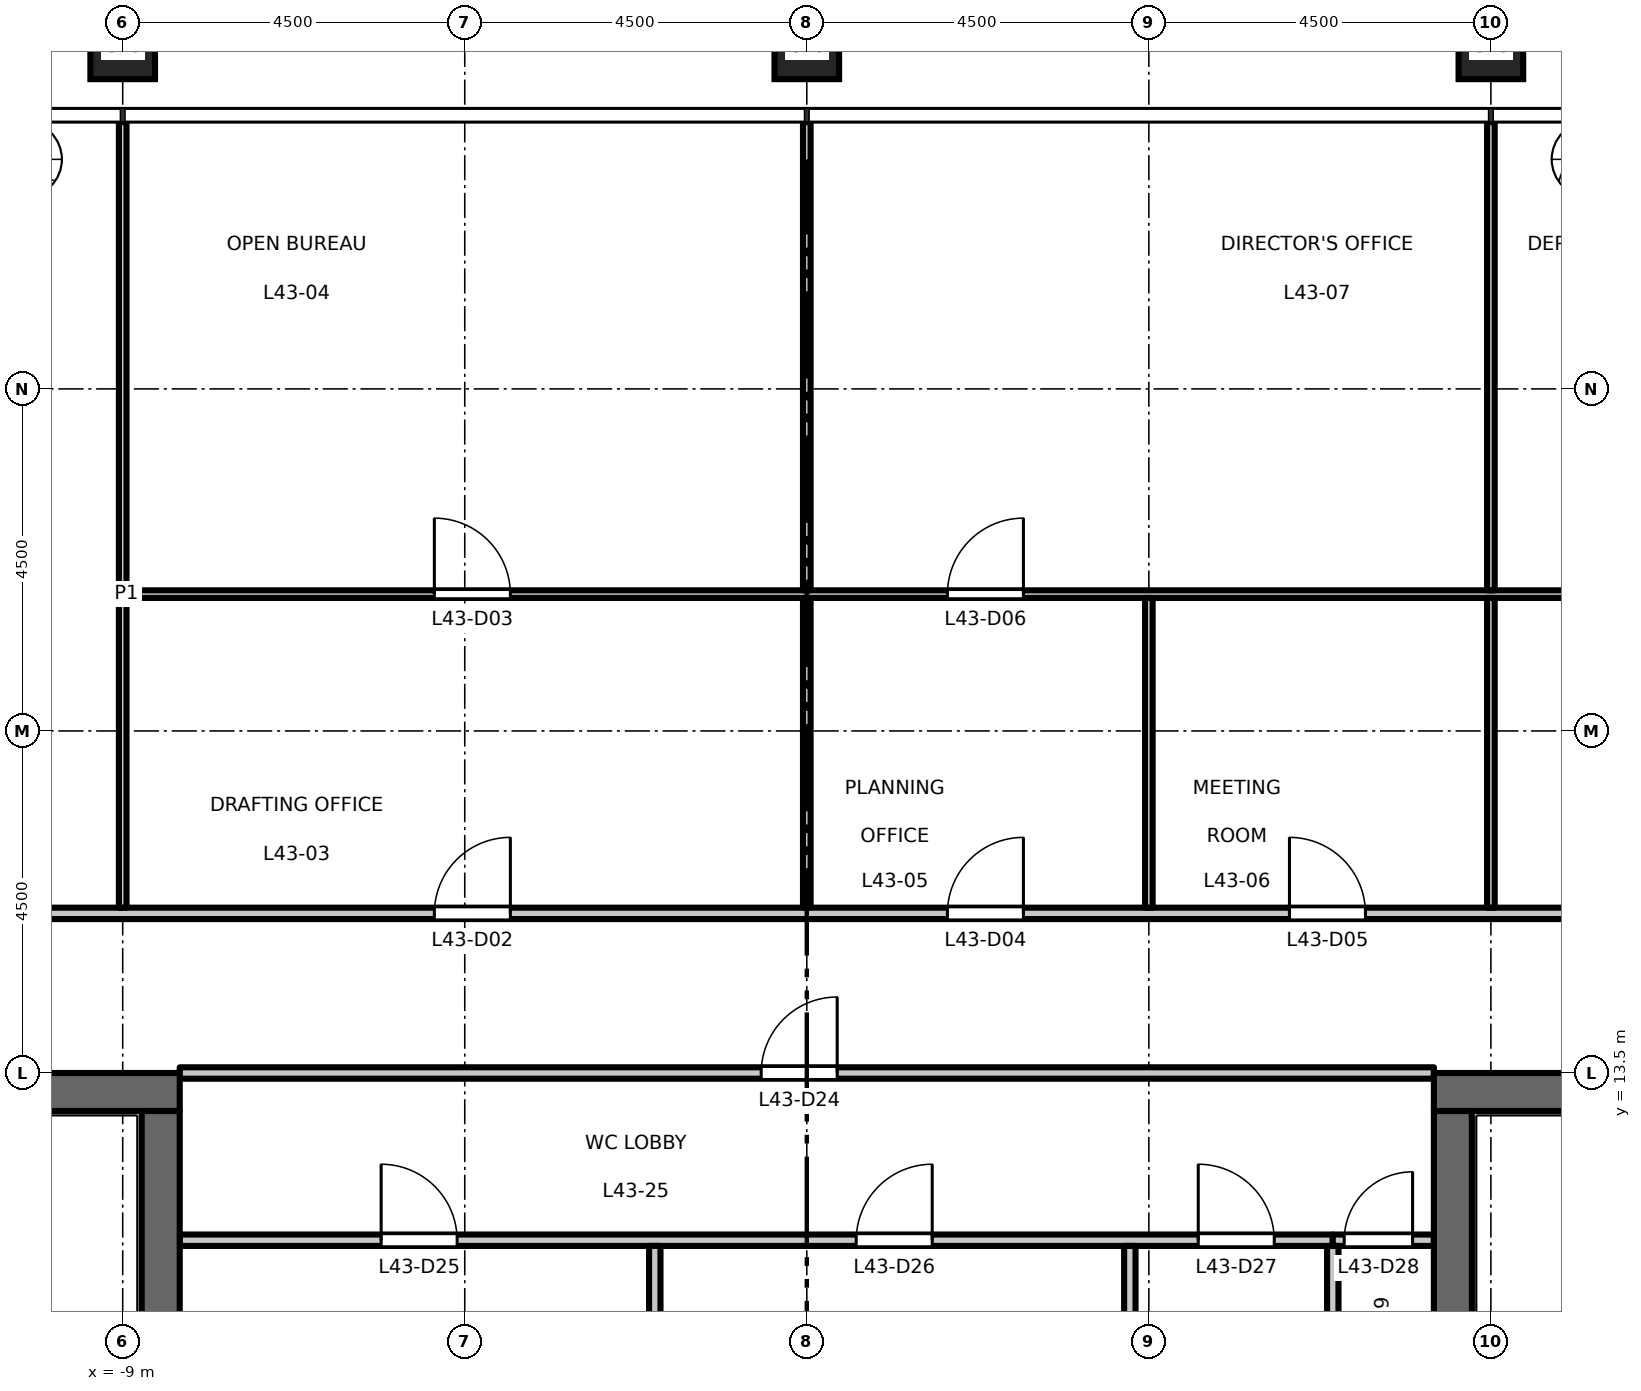
"""IFC4 building model, lengths in metres.
Left out: names, types, materials, properties, quantities, classifications, styles, units other than length and angle.
Written with IfcOpenShell. Run it as: python <this file> out.ifc"""

import sys

from ifc_helpers import new_model, si_unit, direction, frame, frame_2d, origin, origin_2d, place, context, subcontext, project, spatial, rectangle, hollow_rectangle, extrude, element, fill, save


model = new_model("IFC4")
c1 = context("Model", 3, precision=1e-05, world=origin(), true_north=direction((0.0, 1.0)))
c2 = subcontext(c1, "Body", "Model", "MODEL_VIEW")
j1 = project(units=[si_unit("LENGTHUNIT", "METRE"), si_unit("PLANEANGLEUNIT", "RADIAN")], contexts=[c1])
p1 = place(None, origin())
s1 = spatial("IfcSite", under=j1, at=p1, CompositionType="ELEMENT")
p2 = place(p1, origin())
s2 = spatial("IfcBuilding", under=s1, at=p2, CompositionType="ELEMENT")
p3 = place(p2, frame((0.0, 0.0, 201.7)))
s3 = spatial("IfcBuildingStorey", under=s2, at=p3, CompositionType="ELEMENT", Elevation=201.7)
for number, where, z_axis, x_axis in (
    (1, (9.0, 27.0, 0.0), (0.0, 0.0, 1.0), (1.0, 0.0, 0.0)),
    (2, (0.0, 27.0, 0.0), (0.0, 0.0, 1.0), (1.0, 0.0, 0.0)),
    (3, (-9.0, 27.0, 0.0), (0.0, 0.0, 1.0), (1.0, 0.0, 0.0)),
):
    element("IfcColumn", number, at=place(p3, frame(where, z_axis=z_axis, x_axis=x_axis)), inside=s3, PredefinedType="COLUMN", context=c2, shape_type="SweptSolid", body=[
        extrude(hollow_rectangle(XDim=0.85, YDim=0.85, WallThickness=0.05, at=origin_2d()), origin(), (0.0, 0.0, 1.0), 4.5),
    ])
p4 = place(p3, frame((-8.25, 13.25, 0.0), z_axis=(0.0, 0.0, 1.0), x_axis=(-1.0, 0.0, 0.0)))
e4 = element("IfcWall", 4, at=p4, inside=s3, PredefinedType="SHEAR", context=c2, shape_type="SweptSolid", body=[
    extrude(rectangle(XDim=13.5, YDim=0.5, at=frame_2d((6.75, 0.0))), origin(), (0.0, 0.0, 1.0), 4.35),
])
p5 = place(p3, frame((-8.5, -13.0, 0.0), z_axis=(0.0, 0.0, 1.0), x_axis=(0.0, 1.0, 0.0)))
e5 = element("IfcWall", 5, at=p5, inside=s3, PredefinedType="SHEAR", context=c2, shape_type="SweptSolid", body=[
    extrude(rectangle(XDim=26.0, YDim=0.5, at=frame_2d((13.0, 0.0))), origin(), (0.0, 0.0, 1.0), 4.35),
])
p6 = place(p3, frame((8.25, 13.25, 0.0), z_axis=(0.0, 0.0, 1.0), x_axis=(1.0, 0.0, 0.0)))
e6 = element("IfcWall", 6, at=p6, inside=s3, PredefinedType="SHEAR", context=c2, shape_type="SweptSolid", body=[
    extrude(rectangle(XDim=13.5, YDim=0.5, at=frame_2d((6.75, 0.0))), origin(), (0.0, 0.0, 1.0), 4.35),
])
p7 = place(p3, frame((8.5, -13.0, 0.0), z_axis=(0.0, 0.0, 1.0), x_axis=(0.0, 1.0, 0.0)))
e7 = element("IfcWall", 7, at=p7, inside=s3, PredefinedType="SHEAR", context=c2, shape_type="SweptSolid", body=[
    extrude(rectangle(XDim=26.0, YDim=0.5, at=frame_2d((13.0, 0.0))), origin(), (0.0, 0.0, 1.0), 4.35),
])
p8 = place(p3, frame((-8.25, 11.3, 0.0), z_axis=(0.0, 0.0, 1.0), x_axis=(1.0, 0.0, 0.0)))
e8 = element("IfcWall", 8, at=p8, inside=s3, PredefinedType="PARTITIONING", context=c2, shape_type="SweptSolid", body=[
    extrude(rectangle(XDim=15.17, YDim=0.15, at=frame_2d((7.585, 0.0))), origin(), (0.0, 0.0, 1.0), 4.35),
])
p9 = place(p8, frame((2.65, 0.0, 0.0)))
e9 = element("IfcOpeningElement", 9, at=p9, cuts=e8, PredefinedType="OPENING", context=c2, shape_type="SweptSolid", body=[
    extrude(rectangle(XDim=1.0, YDim=2.1, at=frame_2d((0.5, 1.05))), frame((0.0, 0.085, 0.0), z_axis=(0.0, -1.0, 0.0), x_axis=(1.0, 0.0, 0.0)), (0.0, 0.0, 1.0), 0.17),
])
p10 = place(p8, frame((8.9, 0.0, 0.0)))
e10 = element("IfcOpeningElement", 10, at=p10, cuts=e8, PredefinedType="OPENING", context=c2, shape_type="SweptSolid", body=[
    extrude(rectangle(XDim=1.0, YDim=2.1, at=frame_2d((0.5, 1.05))), frame((0.0, 0.085, 0.0), z_axis=(0.0, -1.0, 0.0), x_axis=(1.0, 0.0, 0.0)), (0.0, 0.0, 1.0), 0.17),
])
p11 = place(p8, frame((13.4, 0.0, 0.0)))
e11 = element("IfcOpeningElement", 11, at=p11, cuts=e8, PredefinedType="OPENING", context=c2, shape_type="SweptSolid", body=[
    extrude(rectangle(XDim=1.0, YDim=2.1, at=frame_2d((0.5, 1.05))), frame((0.0, 0.085, 0.0), z_axis=(0.0, -1.0, 0.0), x_axis=(1.0, 0.0, 0.0)), (0.0, 0.0, 1.0), 0.17),
])
p12 = place(p3, frame((6.92, 11.3, 0.0), z_axis=(0.0, 0.0, 1.0), x_axis=(1.0, 0.0, 0.0)))
e12 = element("IfcWall", 12, at=p12, inside=s3, PredefinedType="PARTITIONING", context=c2, shape_type="SweptSolid", body=[
    extrude(rectangle(XDim=1.33, YDim=0.15, at=frame_2d((0.665, 0.0))), origin(), (0.0, 0.0, 1.0), 4.35),
])
p13 = place(p12, frame((0.15, 0.0, 0.0)))
e13 = element("IfcOpeningElement", 13, at=p13, cuts=e12, PredefinedType="OPENING", context=c2, shape_type="SweptSolid", body=[
    extrude(rectangle(XDim=0.9, YDim=2.1, at=frame_2d((0.45, 1.05))), frame((0.0, 0.085, 0.0), z_axis=(0.0, -1.0, 0.0), x_axis=(1.0, 0.0, 0.0)), (0.0, 0.0, 1.0), 0.17),
])
p14 = place(p3, frame((-8.25, 13.5, 0.0), z_axis=(0.0, 0.0, 1.0), x_axis=(1.0, 0.0, 0.0)))
e14 = element("IfcWall", 14, at=p14, inside=s3, PredefinedType="PARTITIONING", context=c2, shape_type="SweptSolid", body=[
    extrude(rectangle(XDim=16.5, YDim=0.15, at=frame_2d((8.25, 0.0))), origin(), (0.0, 0.0, 1.0), 4.35),
])
p15 = place(p14, frame((7.65, 0.0, 0.0)))
e15 = element("IfcOpeningElement", 15, at=p15, cuts=e14, PredefinedType="OPENING", context=c2, shape_type="SweptSolid", body=[
    extrude(rectangle(XDim=1.0, YDim=2.1, at=frame_2d((0.5, 1.05))), frame((0.0, 0.085, 0.0), z_axis=(0.0, -1.0, 0.0), x_axis=(1.0, 0.0, 0.0)), (0.0, 0.0, 1.0), 0.17),
])
p16 = place(p3, frame((-26.01, 15.6, 0.0), z_axis=(0.0, 0.0, 1.0), x_axis=(1.0, 0.0, 0.0)))
e16 = element("IfcWall", 16, at=p16, inside=s3, PredefinedType="PARTITIONING", context=c2, shape_type="SweptSolid", body=[
    extrude(rectangle(XDim=52.02, YDim=0.15, at=frame_2d((26.01, 0.0))), origin(), (0.0, 0.0, 1.0), 4.35),
])
p17 = place(p16, frame((12.11, 0.0, 0.0)))
e17 = element("IfcOpeningElement", 17, at=p17, cuts=e16, PredefinedType="OPENING", context=c2, shape_type="SweptSolid", body=[
    extrude(rectangle(XDim=1.0, YDim=2.1, at=frame_2d((0.5, 1.05))), frame((0.0, 0.085, 0.0), z_axis=(0.0, -1.0, 0.0), x_axis=(1.0, 0.0, 0.0)), (0.0, 0.0, 1.0), 0.17),
])
p18 = place(p16, frame((21.11, 0.0, 0.0)))
e18 = element("IfcOpeningElement", 18, at=p18, cuts=e16, PredefinedType="OPENING", context=c2, shape_type="SweptSolid", body=[
    extrude(rectangle(XDim=1.0, YDim=2.1, at=frame_2d((0.5, 1.05))), frame((0.0, 0.085, 0.0), z_axis=(0.0, -1.0, 0.0), x_axis=(1.0, 0.0, 0.0)), (0.0, 0.0, 1.0), 0.17),
])
p19 = place(p16, frame((27.86, 0.0, 0.0)))
e19 = element("IfcOpeningElement", 19, at=p19, cuts=e16, PredefinedType="OPENING", context=c2, shape_type="SweptSolid", body=[
    extrude(rectangle(XDim=1.0, YDim=2.1, at=frame_2d((0.5, 1.05))), frame((0.0, 0.085, 0.0), z_axis=(0.0, -1.0, 0.0), x_axis=(1.0, 0.0, 0.0)), (0.0, 0.0, 1.0), 0.17),
])
p20 = place(p16, frame((32.36, 0.0, 0.0)))
e20 = element("IfcOpeningElement", 20, at=p20, cuts=e16, PredefinedType="OPENING", context=c2, shape_type="SweptSolid", body=[
    extrude(rectangle(XDim=1.0, YDim=2.1, at=frame_2d((0.5, 1.05))), frame((0.0, 0.085, 0.0), z_axis=(0.0, -1.0, 0.0), x_axis=(1.0, 0.0, 0.0)), (0.0, 0.0, 1.0), 0.17),
])
p21 = place(p16, frame((39.11, 0.0, 0.0)))
e21 = element("IfcOpeningElement", 21, at=p21, cuts=e16, PredefinedType="OPENING", context=c2, shape_type="SweptSolid", body=[
    extrude(rectangle(XDim=1.0, YDim=2.1, at=frame_2d((0.5, 1.05))), frame((0.0, 0.085, 0.0), z_axis=(0.0, -1.0, 0.0), x_axis=(1.0, 0.0, 0.0)), (0.0, 0.0, 1.0), 0.17),
])
p22 = place(p16, frame((3.61, 0.0, 0.0)))
e22 = element("IfcOpeningElement", 22, at=p22, cuts=e16, PredefinedType="OPENING", context=c2, shape_type="SweptSolid", body=[
    extrude(rectangle(XDim=1.0, YDim=2.1, at=frame_2d((0.5, 1.05))), frame((0.0, 0.085, 0.0), z_axis=(0.0, -1.0, 0.0), x_axis=(1.0, 0.0, 0.0)), (0.0, 0.0, 1.0), 0.17),
])
p23 = place(p16, frame((47.62, 0.0, 0.0)))
e23 = element("IfcOpeningElement", 23, at=p23, cuts=e16, PredefinedType="OPENING", context=c2, shape_type="SweptSolid", body=[
    extrude(rectangle(XDim=1.0, YDim=2.1, at=frame_2d((0.5, 1.05))), frame((0.0, 0.085, 0.0), z_axis=(0.0, -1.0, 0.0), x_axis=(1.0, 0.0, 0.0)), (0.0, 0.0, 1.0), 0.17),
])
p24 = place(p3, frame((-8.95, 19.8, 0.0), z_axis=(0.0, 0.0, 1.0), x_axis=(1.0, 0.0, 0.0)))
e24 = element("IfcWall", 24, at=p24, inside=s3, PredefinedType="PARTITIONING", context=c2, shape_type="SweptSolid", body=[
    extrude(rectangle(XDim=34.133, YDim=0.1, at=frame_2d((17.066, 0.0))), origin(), (0.0, 0.0, 1.0), 4.35),
])
p25 = place(p24, frame((4.05, 0.0, 0.0)))
e25 = element("IfcOpeningElement", 25, at=p25, cuts=e24, PredefinedType="OPENING", context=c2, shape_type="SweptSolid", body=[
    extrude(rectangle(XDim=1.0, YDim=2.1, at=frame_2d((0.5, 1.05))), frame((0.0, 0.06, 0.0), z_axis=(0.0, -1.0, 0.0), x_axis=(1.0, 0.0, 0.0)), (0.0, 0.0, 1.0), 0.12),
])
p26 = place(p24, frame((10.8, 0.0, 0.0)))
e26 = element("IfcOpeningElement", 26, at=p26, cuts=e24, PredefinedType="OPENING", context=c2, shape_type="SweptSolid", body=[
    extrude(rectangle(XDim=1.0, YDim=2.1, at=frame_2d((0.5, 1.05))), frame((0.0, 0.06, 0.0), z_axis=(0.0, -1.0, 0.0), x_axis=(1.0, 0.0, 0.0)), (0.0, 0.0, 1.0), 0.12),
])
p27 = place(p24, frame((22.05, 0.0, 0.0)))
e27 = element("IfcOpeningElement", 27, at=p27, cuts=e24, PredefinedType="OPENING", context=c2, shape_type="SweptSolid", body=[
    extrude(rectangle(XDim=1.0, YDim=2.1, at=frame_2d((0.5, 1.05))), frame((0.0, 0.06, 0.0), z_axis=(0.0, -1.0, 0.0), x_axis=(1.0, 0.0, 0.0)), (0.0, 0.0, 1.0), 0.12),
])
p28 = place(p24, frame((29.983, 0.0, 0.0)))
e28 = element("IfcOpeningElement", 28, at=p28, cuts=e24, PredefinedType="OPENING", context=c2, shape_type="SweptSolid", body=[
    extrude(rectangle(XDim=1.0, YDim=2.1, at=frame_2d((0.5, 1.05))), frame((0.0, 0.06, 0.0), z_axis=(0.0, -1.0, 0.0), x_axis=(1.0, 0.0, 0.0)), (0.0, 0.0, 1.0), 0.12),
])
p29 = place(p3, frame((-9.0, 15.675, 0.0), z_axis=(0.0, 0.0, 1.0), x_axis=(0.0, 1.0, 0.0)))
e29 = element("IfcWall", 29, at=p29, inside=s3, PredefinedType="PARTITIONING", context=c2, shape_type="SweptSolid", body=[
    extrude(rectangle(XDim=10.335, YDim=0.1, at=frame_2d((5.167, 0.0))), origin(), (0.0, 0.0, 1.0), 3.65),
])
p30 = place(p3, frame((-2.0, 8.37, 0.0), z_axis=(0.0, 0.0, 1.0), x_axis=(0.0, 1.0, 0.0)))
e30 = element("IfcWall", 30, at=p30, inside=s3, PredefinedType="PARTITIONING", context=c2, shape_type="SweptSolid", body=[
    extrude(rectangle(XDim=2.855, YDim=0.15, at=frame_2d((1.427, 0.0))), origin(), (0.0, 0.0, 1.0), 4.35),
])
p31 = place(p3, frame((0.0, 15.675, 0.0), z_axis=(0.0, 0.0, 1.0), x_axis=(0.0, 1.0, 0.0)))
e31 = element("IfcWall", 31, at=p31, inside=s3, PredefinedType="PARTITIONING", context=c2, shape_type="SweptSolid", body=[
    extrude(rectangle(XDim=4.075, YDim=0.1, at=frame_2d((2.038, 0.0))), origin(), (0.0, 0.0, 1.0), 3.55),
])
p32 = place(p3, frame((0.0, 19.85, 0.0), z_axis=(0.0, 0.0, 1.0), x_axis=(0.0, 1.0, 0.0)))
e32 = element("IfcWall", 32, at=p32, inside=s3, PredefinedType="PARTITIONING", context=c2, shape_type="SweptSolid", body=[
    extrude(rectangle(XDim=6.16, YDim=0.1, at=frame_2d((3.08, 0.0))), origin(), (0.0, 0.0, 1.0), 3.55),
])
p33 = place(p3, frame((4.25, 8.37, 0.0), z_axis=(0.0, 0.0, 1.0), x_axis=(0.0, 1.0, 0.0)))
e33 = element("IfcWall", 33, at=p33, inside=s3, PredefinedType="PARTITIONING", context=c2, shape_type="SweptSolid", body=[
    extrude(rectangle(XDim=2.855, YDim=0.15, at=frame_2d((1.427, 0.0))), origin(), (0.0, 0.0, 1.0), 4.35),
])
p34 = place(p3, frame((4.5, 15.675, 0.0), z_axis=(0.0, 0.0, 1.0), x_axis=(0.0, 1.0, 0.0)))
e34 = element("IfcWall", 34, at=p34, inside=s3, PredefinedType="PARTITIONING", context=c2, shape_type="SweptSolid", body=[
    extrude(rectangle(XDim=4.075, YDim=0.1, at=frame_2d((2.038, 0.0))), origin(), (0.0, 0.0, 1.0), 4.35),
])
p35 = place(p3, frame((6.92, 8.029, 0.0), z_axis=(0.0, 0.0, 1.0), x_axis=(0.0, 1.0, 0.0)))
e35 = element("IfcWall", 35, at=p35, inside=s3, PredefinedType="PARTITIONING", context=c2, shape_type="SweptSolid", body=[
    extrude(rectangle(XDim=3.196, YDim=0.15, at=frame_2d((1.598, 0.0))), origin(), (0.0, 0.0, 1.0), 4.35),
])
p36 = place(p3, frame((9.0, 15.675, 0.0), z_axis=(0.0, 0.0, 1.0), x_axis=(0.0, 1.0, 0.0)))
e36 = element("IfcWall", 36, at=p36, inside=s3, PredefinedType="PARTITIONING", context=c2, shape_type="SweptSolid", body=[
    extrude(rectangle(XDim=4.075, YDim=0.1, at=frame_2d((2.038, 0.0))), origin(), (0.0, 0.0, 1.0), 3.65),
])
p37 = place(p3, frame((9.0, 19.85, 0.0), z_axis=(0.0, 0.0, 1.0), x_axis=(0.0, 1.0, 0.0)))
e37 = element("IfcWall", 37, at=p37, inside=s3, PredefinedType="PARTITIONING", context=c2, shape_type="SweptSolid", body=[
    extrude(rectangle(XDim=6.16, YDim=0.1, at=frame_2d((3.08, 0.0))), origin(), (0.0, 0.0, 1.0), 3.65),
])
p38 = place(p18, origin())
e38 = element("IfcDoor", 38, at=p38, inside=s3, OperationType="SINGLE_SWING_RIGHT", PredefinedType="DOOR", context=c2, shape_type="SweptSolid", body=[
    extrude(rectangle(XDim=1.0, YDim=2.1, at=frame_2d((0.5, 1.05))), frame((0.0, 0.025, 0.0), z_axis=(0.0, -1.0, 0.0), x_axis=(1.0, 0.0, 0.0)), (0.0, 0.0, 1.0), 0.05),
])
fill(e18, e38)
p39 = place(p25, origin())
e39 = element("IfcDoor", 39, at=p39, inside=s3, OperationType="SINGLE_SWING_LEFT", PredefinedType="DOOR", context=c2, shape_type="SweptSolid", body=[
    extrude(rectangle(XDim=1.0, YDim=2.1, at=frame_2d((0.5, 1.05))), frame((0.0, 0.025, 0.0), z_axis=(0.0, -1.0, 0.0), x_axis=(1.0, 0.0, 0.0)), (0.0, 0.0, 1.0), 0.05),
])
fill(e25, e39)
p40 = place(p19, origin())
e40 = element("IfcDoor", 40, at=p40, inside=s3, OperationType="SINGLE_SWING_RIGHT", PredefinedType="DOOR", context=c2, shape_type="SweptSolid", body=[
    extrude(rectangle(XDim=1.0, YDim=2.1, at=frame_2d((0.5, 1.05))), frame((0.0, 0.025, 0.0), z_axis=(0.0, -1.0, 0.0), x_axis=(1.0, 0.0, 0.0)), (0.0, 0.0, 1.0), 0.05),
])
fill(e19, e40)
p41 = place(p20, origin())
e41 = element("IfcDoor", 41, at=p41, inside=s3, OperationType="SINGLE_SWING_LEFT", PredefinedType="DOOR", context=c2, shape_type="SweptSolid", body=[
    extrude(rectangle(XDim=1.0, YDim=2.1, at=frame_2d((0.5, 1.05))), frame((0.0, 0.025, 0.0), z_axis=(0.0, -1.0, 0.0), x_axis=(1.0, 0.0, 0.0)), (0.0, 0.0, 1.0), 0.05),
])
fill(e20, e41)
p42 = place(p26, origin())
e42 = element("IfcDoor", 42, at=p42, inside=s3, OperationType="SINGLE_SWING_RIGHT", PredefinedType="DOOR", context=c2, shape_type="SweptSolid", body=[
    extrude(rectangle(XDim=1.0, YDim=2.1, at=frame_2d((0.5, 1.05))), frame((0.0, 0.025, 0.0), z_axis=(0.0, -1.0, 0.0), x_axis=(1.0, 0.0, 0.0)), (0.0, 0.0, 1.0), 0.05),
])
fill(e26, e42)
p43 = place(p15, origin())
e43 = element("IfcDoor", 43, at=p43, inside=s3, OperationType="SINGLE_SWING_RIGHT", PredefinedType="DOOR", context=c2, shape_type="SweptSolid", body=[
    extrude(rectangle(XDim=1.0, YDim=2.1, at=frame_2d((0.5, 1.05))), frame((0.0, 0.025, 0.0), z_axis=(0.0, -1.0, 0.0), x_axis=(1.0, 0.0, 0.0)), (0.0, 0.0, 1.0), 0.05),
])
fill(e15, e43)
p44 = place(p9, origin())
e44 = element("IfcDoor", 44, at=p44, inside=s3, OperationType="SINGLE_SWING_LEFT", PredefinedType="DOOR", context=c2, shape_type="SweptSolid", body=[
    extrude(rectangle(XDim=1.0, YDim=2.1, at=frame_2d((0.5, 1.05))), frame((0.0, 0.025, 0.0), z_axis=(0.0, -1.0, 0.0), x_axis=(1.0, 0.0, 0.0)), (0.0, 0.0, 1.0), 0.05),
])
fill(e9, e44)
p45 = place(p10, origin())
e45 = element("IfcDoor", 45, at=p45, inside=s3, OperationType="SINGLE_SWING_RIGHT", PredefinedType="DOOR", context=c2, shape_type="SweptSolid", body=[
    extrude(rectangle(XDim=1.0, YDim=2.1, at=frame_2d((0.5, 1.05))), frame((0.0, 0.025, 0.0), z_axis=(0.0, -1.0, 0.0), x_axis=(1.0, 0.0, 0.0)), (0.0, 0.0, 1.0), 0.05),
])
fill(e10, e45)
p46 = place(p11, origin())
e46 = element("IfcDoor", 46, at=p46, inside=s3, OperationType="SINGLE_SWING_LEFT", PredefinedType="DOOR", context=c2, shape_type="SweptSolid", body=[
    extrude(rectangle(XDim=1.0, YDim=2.1, at=frame_2d((0.5, 1.05))), frame((0.0, 0.025, 0.0), z_axis=(0.0, -1.0, 0.0), x_axis=(1.0, 0.0, 0.0)), (0.0, 0.0, 1.0), 0.05),
])
fill(e11, e46)
p47 = place(p13, origin())
e47 = element("IfcDoor", 47, at=p47, inside=s3, OperationType="SINGLE_SWING_RIGHT", PredefinedType="DOOR", context=c2, shape_type="SweptSolid", body=[
    extrude(rectangle(XDim=0.9, YDim=2.1, at=frame_2d((0.45, 1.05))), frame((0.0, 0.025, 0.0), z_axis=(0.0, -1.0, 0.0), x_axis=(1.0, 0.0, 0.0)), (0.0, 0.0, 1.0), 0.05),
])
fill(e13, e47)
save(model, sys.argv[1])
